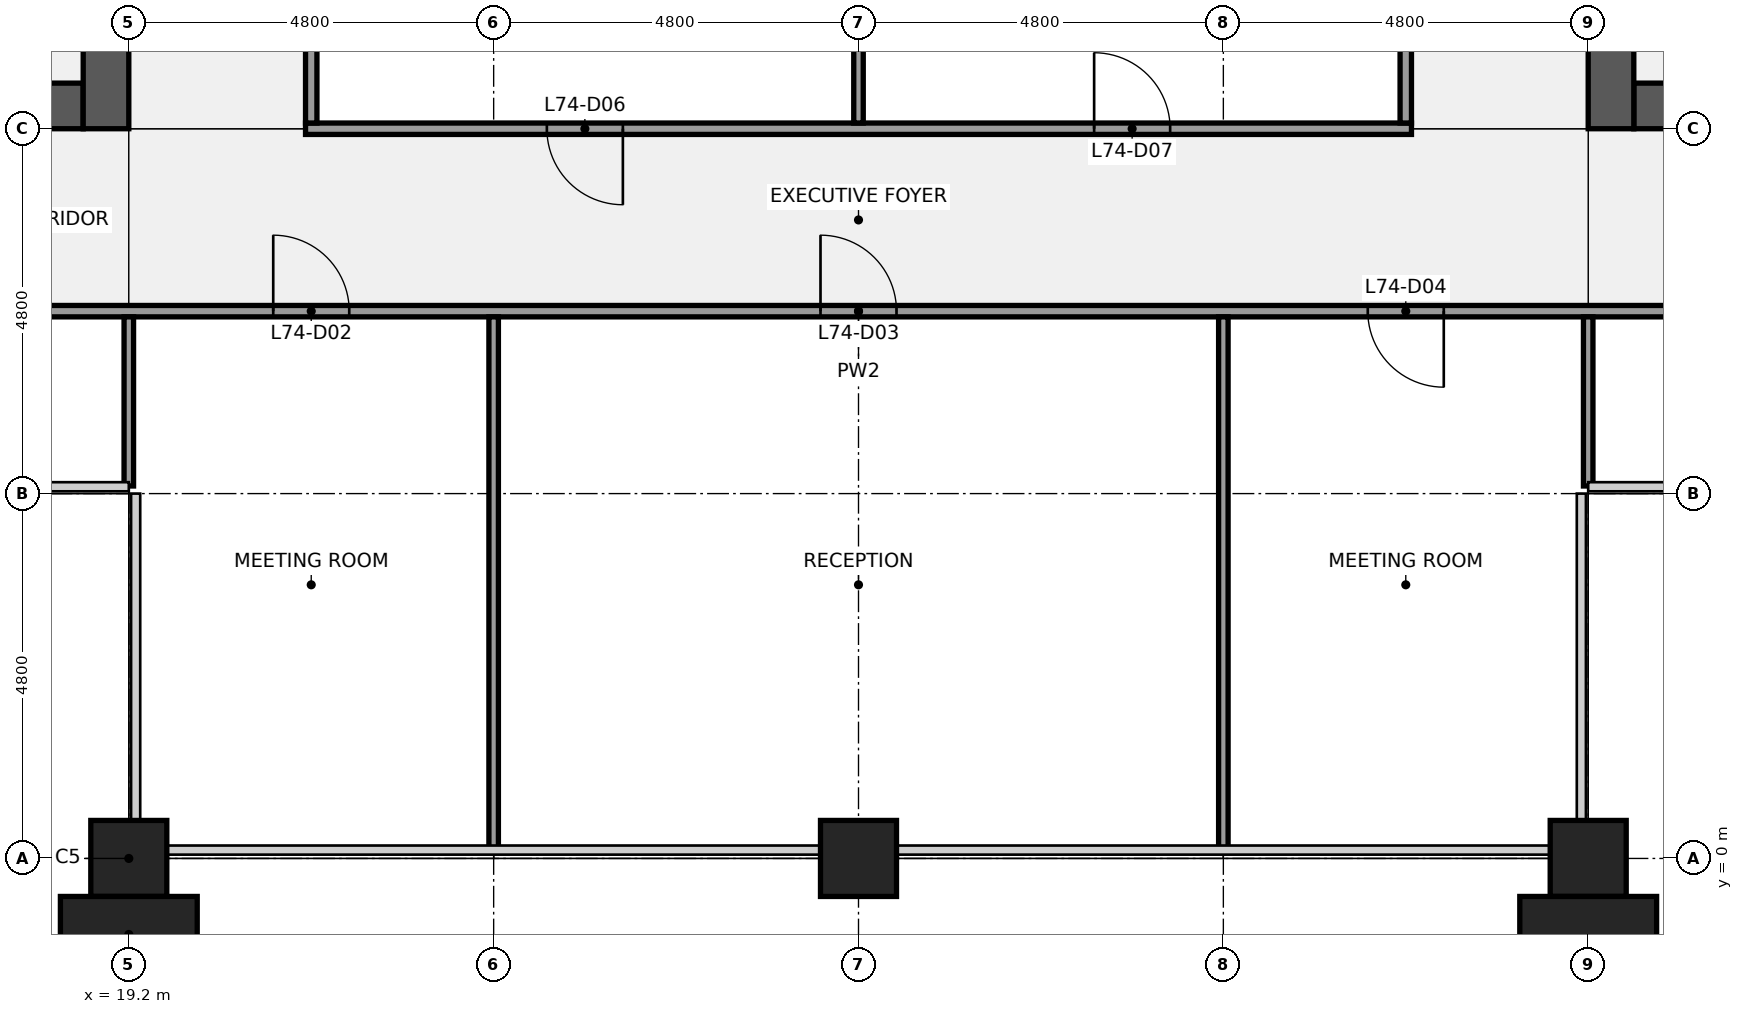
"""IFC4 building model, lengths in metres.
Left out: names, types, materials, properties, quantities, classifications, styles, units other than length and angle.
Written with IfcOpenShell. Run it as: python <this file> out.ifc"""

import sys

from ifc_helpers import new_model, si_unit, direction, frame, frame_2d, origin, origin_2d, place, context, subcontext, project, spatial, rectangle, extrude, element, fill, save


model = new_model("IFC4")
c1 = context("Model", 3, precision=1e-05, world=origin(), true_north=direction((0.0, 1.0)))
c2 = subcontext(c1, "Body", "Model", "MODEL_VIEW")
j1 = project(units=[si_unit("LENGTHUNIT", "METRE"), si_unit("PLANEANGLEUNIT", "RADIAN")], contexts=[c1])
p1 = place(None, origin())
s1 = spatial("IfcSite", under=j1, at=p1, CompositionType="ELEMENT")
p2 = place(p1, origin())
s2 = spatial("IfcBuilding", under=s1, at=p2, CompositionType="ELEMENT")
p3 = place(p2, frame((0.0, 0.0, 334.3)))
s3 = spatial("IfcBuildingStorey", under=s2, at=p3, CompositionType="ELEMENT", Elevation=334.3)
for number, where, z_axis, x_axis in (
    (1, (19.2, 0.0, 0.0), (0.0, 0.0, 1.0), (1.0, 0.0, 0.0)),
    (2, (28.8, 0.0, 0.0), (0.0, 0.0, 1.0), (1.0, 0.0, 0.0)),
    (3, (38.4, 0.0, 0.0), (0.0, 0.0, 1.0), (1.0, 0.0, 0.0)),
):
    element("IfcColumn", number, at=place(p3, frame(where, z_axis=z_axis, x_axis=x_axis)), inside=s3, PredefinedType="COLUMN", context=c2, shape_type="SweptSolid", body=[
        extrude(rectangle(XDim=1.0, YDim=1.0, at=origin_2d()), origin(), (0.0, 0.0, 1.0), 4.0),
    ])
p4 = place(p3, frame((18.6, 9.9, 0.0), z_axis=(0.0, 0.0, 1.0), x_axis=(-1.0, 0.0, 0.0)))
e4 = element("IfcWall", 4, at=p4, inside=s3, PredefinedType="SHEAR", context=c2, shape_type="SweptSolid", body=[
    extrude(rectangle(XDim=4.2, YDim=0.6, at=frame_2d((2.1, 0.0))), origin(), (0.0, 0.0, 1.0), 3.84),
])
p5 = place(p4, frame((1.25, 0.0, 0.0)))
e5 = element("IfcOpeningElement", 5, at=p5, cuts=e4, PredefinedType="OPENING", context=c2, shape_type="SweptSolid", body=[
    extrude(rectangle(XDim=1.1, YDim=2.1, at=frame_2d((0.55, 1.05))), frame((0.0, 0.31, 0.0), z_axis=(0.0, -1.0, 0.0), x_axis=(1.0, 0.0, 0.0)), (0.0, 0.0, 1.0), 0.62),
])
p6 = place(p3, frame((18.9, 38.4, 0.0), z_axis=(0.0, 0.0, 1.0), x_axis=(0.0, -1.0, 0.0)))
e6 = element("IfcWall", 6, at=p6, inside=s3, PredefinedType="SHEAR", context=c2, shape_type="SweptSolid", body=[
    extrude(rectangle(XDim=28.8, YDim=0.6, at=frame_2d((14.4, 0.0))), origin(), (0.0, 0.0, 1.0), 3.84),
])
p7 = place(p6, frame((18.3, 0.0, 0.0)))
e7 = element("IfcOpeningElement", 7, at=p7, cuts=e6, PredefinedType="OPENING", context=c2, shape_type="SweptSolid", body=[
    extrude(rectangle(XDim=1.8, YDim=2.1, at=frame_2d((0.9, 1.05))), frame((0.0, 0.31, 0.0), z_axis=(0.0, -1.0, 0.0), x_axis=(1.0, 0.0, 0.0)), (0.0, 0.0, 1.0), 0.62),
])
p8 = place(p6, frame((8.7, 0.0, 0.0)))
e8 = element("IfcOpeningElement", 8, at=p8, cuts=e6, PredefinedType="OPENING", context=c2, shape_type="SweptSolid", body=[
    extrude(rectangle(XDim=1.8, YDim=2.1, at=frame_2d((0.9, 1.05))), frame((0.0, 0.31, 0.0), z_axis=(0.0, -1.0, 0.0), x_axis=(1.0, 0.0, 0.0)), (0.0, 0.0, 1.0), 0.62),
])
p9 = place(p3, frame((43.2, 9.9, 0.0), z_axis=(0.0, 0.0, 1.0), x_axis=(-1.0, 0.0, 0.0)))
e9 = element("IfcWall", 9, at=p9, inside=s3, PredefinedType="SHEAR", context=c2, shape_type="SweptSolid", body=[
    extrude(rectangle(XDim=4.2, YDim=0.6, at=frame_2d((2.1, 0.0))), origin(), (0.0, 0.0, 1.0), 3.84),
])
p10 = place(p9, frame((1.85, 0.0, 0.0)))
e10 = element("IfcOpeningElement", 10, at=p10, cuts=e9, PredefinedType="OPENING", context=c2, shape_type="SweptSolid", body=[
    extrude(rectangle(XDim=1.1, YDim=2.1, at=frame_2d((0.55, 1.05))), frame((0.0, 0.31, 0.0), z_axis=(0.0, -1.0, 0.0), x_axis=(1.0, 0.0, 0.0)), (0.0, 0.0, 1.0), 0.62),
])
p11 = place(p3, frame((38.7, 9.6, 0.0), z_axis=(0.0, 0.0, 1.0), x_axis=(0.0, 1.0, 0.0)))
e11 = element("IfcWall", 11, at=p11, inside=s3, PredefinedType="SHEAR", context=c2, shape_type="SweptSolid", body=[
    extrude(rectangle(XDim=28.8, YDim=0.6, at=frame_2d((14.4, 0.0))), origin(), (0.0, 0.0, 1.0), 3.84),
])
p12 = place(p11, frame((8.7, 0.0, 0.0)))
e12 = element("IfcOpeningElement", 12, at=p12, cuts=e11, PredefinedType="OPENING", context=c2, shape_type="SweptSolid", body=[
    extrude(rectangle(XDim=1.8, YDim=2.1, at=frame_2d((0.9, 1.05))), frame((0.0, 0.31, 0.0), z_axis=(0.0, -1.0, 0.0), x_axis=(1.0, 0.0, 0.0)), (0.0, 0.0, 1.0), 0.62),
])
p13 = place(p11, frame((18.3, 0.0, 0.0)))
e13 = element("IfcOpeningElement", 13, at=p13, cuts=e11, PredefinedType="OPENING", context=c2, shape_type="SweptSolid", body=[
    extrude(rectangle(XDim=1.8, YDim=2.1, at=frame_2d((0.9, 1.05))), frame((0.0, 0.31, 0.0), z_axis=(0.0, -1.0, 0.0), x_axis=(1.0, 0.0, 0.0)), (0.0, 0.0, 1.0), 0.62),
])
p14 = place(p3, frame((14.5, 7.2, 0.0), z_axis=(0.0, 0.0, 1.0), x_axis=(1.0, 0.0, 0.0)))
e14 = element("IfcWall", 14, at=p14, inside=s3, PredefinedType="PARTITIONING", context=c2, shape_type="SweptSolid", body=[
    extrude(rectangle(XDim=28.6, YDim=0.15, at=frame_2d((14.3, 0.0))), origin(), (0.0, 0.0, 1.0), 2.849),
])
p15 = place(p14, frame((1.85, 0.0, 0.0)))
e15 = element("IfcOpeningElement", 15, at=p15, cuts=e14, PredefinedType="OPENING", context=c2, shape_type="SweptSolid", body=[
    extrude(rectangle(XDim=1.0, YDim=2.1, at=frame_2d((0.5, 1.05))), frame((0.0, 0.085, 0.0), z_axis=(0.0, -1.0, 0.0), x_axis=(1.0, 0.0, 0.0)), (0.0, 0.0, 1.0), 0.17),
])
p16 = place(p14, frame((6.6, 0.0, 0.0)))
e16 = element("IfcOpeningElement", 16, at=p16, cuts=e14, PredefinedType="OPENING", context=c2, shape_type="SweptSolid", body=[
    extrude(rectangle(XDim=1.0, YDim=2.1, at=frame_2d((0.5, 1.05))), frame((0.0, 0.085, 0.0), z_axis=(0.0, -1.0, 0.0), x_axis=(1.0, 0.0, 0.0)), (0.0, 0.0, 1.0), 0.17),
])
p17 = place(p14, frame((13.8, 0.0, 0.0)))
e17 = element("IfcOpeningElement", 17, at=p17, cuts=e14, PredefinedType="OPENING", context=c2, shape_type="SweptSolid", body=[
    extrude(rectangle(XDim=1.0, YDim=2.1, at=frame_2d((0.5, 1.05))), frame((0.0, 0.085, 0.0), z_axis=(0.0, -1.0, 0.0), x_axis=(1.0, 0.0, 0.0)), (0.0, 0.0, 1.0), 0.17),
])
p18 = place(p14, frame((21.0, 0.0, 0.0)))
e18 = element("IfcOpeningElement", 18, at=p18, cuts=e14, PredefinedType="OPENING", context=c2, shape_type="SweptSolid", body=[
    extrude(rectangle(XDim=1.0, YDim=2.1, at=frame_2d((0.5, 1.05))), frame((0.0, 0.085, 0.0), z_axis=(0.0, -1.0, 0.0), x_axis=(1.0, 0.0, 0.0)), (0.0, 0.0, 1.0), 0.17),
])
p19 = place(p14, frame((25.75, 0.0, 0.0)))
e19 = element("IfcOpeningElement", 19, at=p19, cuts=e14, PredefinedType="OPENING", context=c2, shape_type="SweptSolid", body=[
    extrude(rectangle(XDim=1.0, YDim=2.1, at=frame_2d((0.5, 1.05))), frame((0.0, 0.085, 0.0), z_axis=(0.0, -1.0, 0.0), x_axis=(1.0, 0.0, 0.0)), (0.0, 0.0, 1.0), 0.17),
])
p20 = place(p3, frame((21.525, 9.6, 0.0), z_axis=(0.0, 0.0, 1.0), x_axis=(1.0, 0.0, 0.0)))
e20 = element("IfcWall", 20, at=p20, inside=s3, PredefinedType="PARTITIONING", context=c2, shape_type="SweptSolid", body=[
    extrude(rectangle(XDim=14.55, YDim=0.15, at=frame_2d((7.275, 0.0))), origin(), (0.0, 0.0, 1.0), 2.849),
])
p21 = place(p20, frame((3.175, 0.0, 0.0)))
e21 = element("IfcOpeningElement", 21, at=p21, cuts=e20, PredefinedType="OPENING", context=c2, shape_type="SweptSolid", body=[
    extrude(rectangle(XDim=1.0, YDim=2.1, at=frame_2d((0.5, 1.05))), frame((0.0, 0.085, 0.0), z_axis=(0.0, -1.0, 0.0), x_axis=(1.0, 0.0, 0.0)), (0.0, 0.0, 1.0), 0.17),
])
p22 = place(p20, frame((10.375, 0.0, 0.0)))
e22 = element("IfcOpeningElement", 22, at=p22, cuts=e20, PredefinedType="OPENING", context=c2, shape_type="SweptSolid", body=[
    extrude(rectangle(XDim=1.0, YDim=2.1, at=frame_2d((0.5, 1.05))), frame((0.0, 0.085, 0.0), z_axis=(0.0, -1.0, 0.0), x_axis=(1.0, 0.0, 0.0)), (0.0, 0.0, 1.0), 0.17),
])
p23 = place(p3, frame((19.2, 4.9, 0.0), z_axis=(0.0, 0.0, 1.0), x_axis=(0.0, 1.0, 0.0)))
e23 = element("IfcWall", 23, at=p23, inside=s3, PredefinedType="PARTITIONING", context=c2, shape_type="SweptSolid", body=[
    extrude(rectangle(XDim=2.225, YDim=0.125, at=frame_2d((1.113, 0.0))), origin(), (0.0, 0.0, 1.0), 2.849),
])
p24 = place(p3, frame((21.6, 9.675, 0.0), z_axis=(0.0, 0.0, 1.0), x_axis=(0.0, 1.0, 0.0)))
e24 = element("IfcWall", 24, at=p24, inside=s3, PredefinedType="PARTITIONING", context=c2, shape_type="SweptSolid", body=[
    extrude(rectangle(XDim=4.65, YDim=0.15, at=frame_2d((2.325, 0.0))), origin(), (0.0, 0.0, 1.0), 2.849),
])
p25 = place(p3, frame((24.0, 0.1, 0.0), z_axis=(0.0, 0.0, 1.0), x_axis=(0.0, 1.0, 0.0)))
e25 = element("IfcWall", 25, at=p25, inside=s3, PredefinedType="PARTITIONING", context=c2, shape_type="SweptSolid", body=[
    extrude(rectangle(XDim=7.025, YDim=0.125, at=frame_2d((3.512, 0.0))), origin(), (0.0, 0.0, 1.0), 2.849),
])
p26 = place(p3, frame((28.8, 9.675, 0.0), z_axis=(0.0, 0.0, 1.0), x_axis=(0.0, 1.0, 0.0)))
e26 = element("IfcWall", 26, at=p26, inside=s3, PredefinedType="PARTITIONING", context=c2, shape_type="SweptSolid", body=[
    extrude(rectangle(XDim=4.662, YDim=0.125, at=frame_2d((2.331, 0.0))), origin(), (0.0, 0.0, 1.0), 2.849),
])
p27 = place(p3, frame((33.6, 0.1, 0.0), z_axis=(0.0, 0.0, 1.0), x_axis=(0.0, 1.0, 0.0)))
e27 = element("IfcWall", 27, at=p27, inside=s3, PredefinedType="PARTITIONING", context=c2, shape_type="SweptSolid", body=[
    extrude(rectangle(XDim=7.025, YDim=0.125, at=frame_2d((3.512, 0.0))), origin(), (0.0, 0.0, 1.0), 2.849),
])
p28 = place(p3, frame((36.0, 9.675, 0.0), z_axis=(0.0, 0.0, 1.0), x_axis=(0.0, 1.0, 0.0)))
e28 = element("IfcWall", 28, at=p28, inside=s3, PredefinedType="PARTITIONING", context=c2, shape_type="SweptSolid", body=[
    extrude(rectangle(XDim=4.65, YDim=0.15, at=frame_2d((2.325, 0.0))), origin(), (0.0, 0.0, 1.0), 2.849),
])
p29 = place(p3, frame((38.4, 4.9, 0.0), z_axis=(0.0, 0.0, 1.0), x_axis=(0.0, 1.0, 0.0)))
e29 = element("IfcWall", 29, at=p29, inside=s3, PredefinedType="PARTITIONING", context=c2, shape_type="SweptSolid", body=[
    extrude(rectangle(XDim=2.225, YDim=0.125, at=frame_2d((1.113, 0.0))), origin(), (0.0, 0.0, 1.0), 2.849),
])
for number, where, z_axis, x_axis in (
    (30, (19.2, -1.0, 0.0), (0.0, 0.0, 1.0), (1.0, 0.0, 0.0)),
    (31, (38.4, -1.0, 0.0), (0.0, 0.0, 1.0), (1.0, 0.0, 0.0)),
):
    element("IfcColumn", number, at=place(p3, frame(where, z_axis=z_axis, x_axis=x_axis)), inside=s3, PredefinedType="PILASTER", context=c2, shape_type="SweptSolid", body=[
        extrude(rectangle(XDim=1.8, YDim=1.0, at=origin_2d()), origin(), (0.0, 0.0, 1.0), 4.0),
    ])
p30 = place(p16, origin())
e32 = element("IfcDoor", 32, at=p30, inside=s3, OperationType="SINGLE_SWING_LEFT", PredefinedType="DOOR", context=c2, shape_type="SweptSolid", body=[
    extrude(rectangle(XDim=1.0, YDim=2.1, at=frame_2d((0.5, 1.05))), frame((0.0, 0.025, 0.0), z_axis=(0.0, -1.0, 0.0), x_axis=(1.0, 0.0, 0.0)), (0.0, 0.0, 1.0), 0.05),
])
fill(e16, e32)
p31 = place(p17, origin())
e33 = element("IfcDoor", 33, at=p31, inside=s3, OperationType="SINGLE_SWING_LEFT", PredefinedType="DOOR", context=c2, shape_type="SweptSolid", body=[
    extrude(rectangle(XDim=1.0, YDim=2.1, at=frame_2d((0.5, 1.05))), frame((0.0, 0.025, 0.0), z_axis=(0.0, -1.0, 0.0), x_axis=(1.0, 0.0, 0.0)), (0.0, 0.0, 1.0), 0.05),
])
fill(e17, e33)
p32 = place(p18, origin())
e34 = element("IfcDoor", 34, at=p32, inside=s3, OperationType="SINGLE_SWING_RIGHT", PredefinedType="DOOR", context=c2, shape_type="SweptSolid", body=[
    extrude(rectangle(XDim=1.0, YDim=2.1, at=frame_2d((0.5, 1.05))), frame((0.0, 0.025, 0.0), z_axis=(0.0, -1.0, 0.0), x_axis=(1.0, 0.0, 0.0)), (0.0, 0.0, 1.0), 0.05),
])
fill(e18, e34)
p33 = place(p21, origin())
e35 = element("IfcDoor", 35, at=p33, inside=s3, OperationType="SINGLE_SWING_RIGHT", PredefinedType="DOOR", context=c2, shape_type="SweptSolid", body=[
    extrude(rectangle(XDim=1.0, YDim=2.1, at=frame_2d((0.5, 1.05))), frame((0.0, 0.025, 0.0), z_axis=(0.0, -1.0, 0.0), x_axis=(1.0, 0.0, 0.0)), (0.0, 0.0, 1.0), 0.05),
])
fill(e21, e35)
p34 = place(p22, origin())
e36 = element("IfcDoor", 36, at=p34, inside=s3, OperationType="SINGLE_SWING_LEFT", PredefinedType="DOOR", context=c2, shape_type="SweptSolid", body=[
    extrude(rectangle(XDim=1.0, YDim=2.1, at=frame_2d((0.5, 1.05))), frame((0.0, 0.025, 0.0), z_axis=(0.0, -1.0, 0.0), x_axis=(1.0, 0.0, 0.0)), (0.0, 0.0, 1.0), 0.05),
])
fill(e22, e36)
save(model, sys.argv[1])
